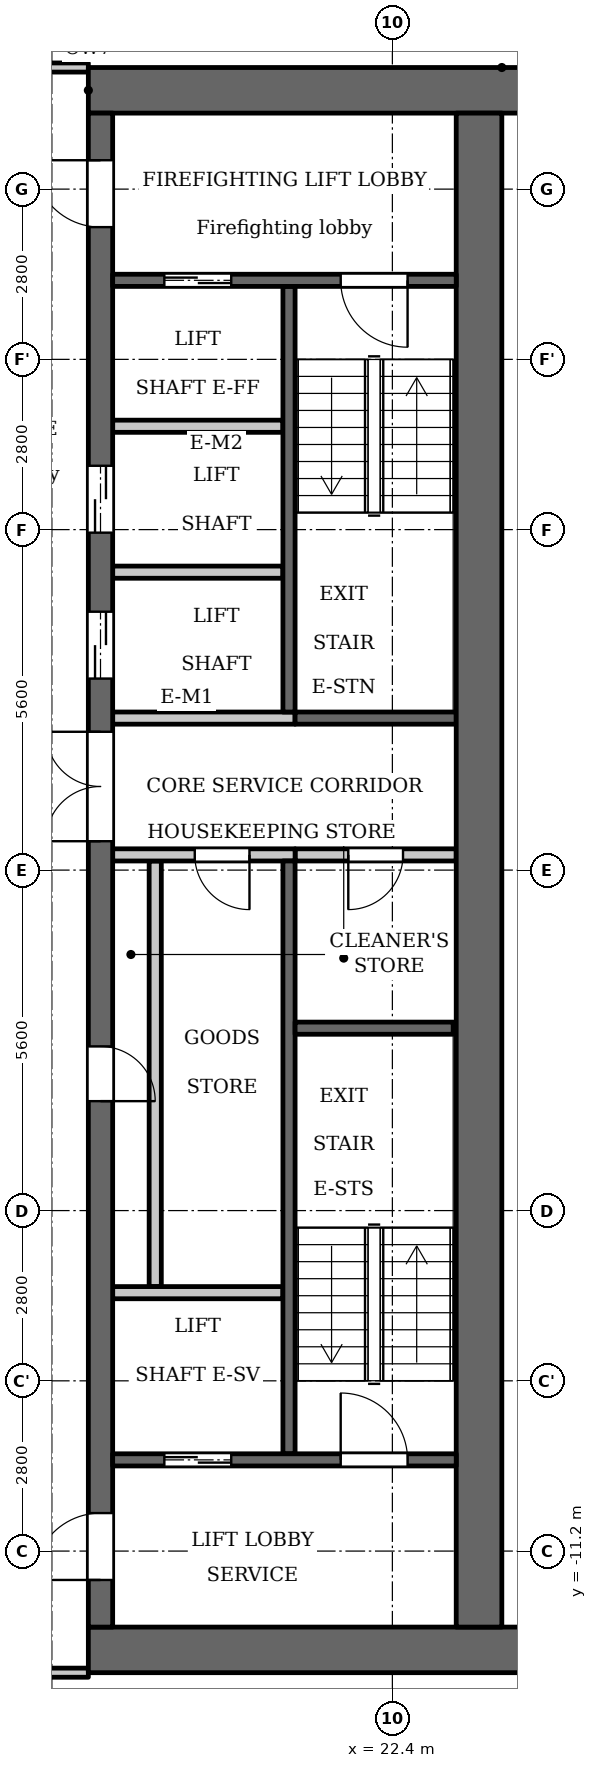
"""IFC4 building model, lengths in metres.
Left out: names, types, materials, properties, quantities, classifications, styles, units other than length and angle.
Written with IfcOpenShell. Run it as: python <this file> out.ifc"""

import sys

from ifc_helpers import new_model, si_unit, direction, frame, frame_2d, origin, place, context, subcontext, project, spatial, rectangle, extrude, element, fill, save


model = new_model("IFC4")
c1 = context("Model", 3, precision=1e-05, world=origin(), true_north=direction((0.0, 1.0)))
c2 = subcontext(c1, "Body", "Model", "MODEL_VIEW")
j1 = project(units=[si_unit("LENGTHUNIT", "METRE"), si_unit("PLANEANGLEUNIT", "RADIAN")], contexts=[c1])
p1 = place(None, origin())
s1 = spatial("IfcSite", under=j1, at=p1, CompositionType="ELEMENT")
p2 = place(p1, origin())
s2 = spatial("IfcBuilding", under=s1, at=p2, CompositionType="ELEMENT")
p3 = place(p2, frame((0.0, 0.0, 223.9)))
s3 = spatial("IfcBuildingStorey", under=s2, at=p3, CompositionType="ELEMENT", Elevation=223.9)
p4 = place(p3, frame((20.7, 2.6, 0.0), z_axis=(0.0, 0.0, 1.0), x_axis=(0.0, 1.0, 0.0)))
e1 = element("IfcWall", 1, at=p4, inside=s3, PredefinedType="SHEAR", context=c2, shape_type="SweptSolid", body=[
    extrude(rectangle(XDim=7.0, YDim=0.2, at=frame_2d((3.5, 0.0))), origin(), (0.0, 0.0, 1.0), 3.2),
])
p5 = place(p3, frame((20.7, -9.6, 0.0), z_axis=(0.0, 0.0, 1.0), x_axis=(0.0, 1.0, 0.0)))
e2 = element("IfcWall", 2, at=p5, inside=s3, PredefinedType="SHEAR", context=c2, shape_type="SweptSolid", body=[
    extrude(rectangle(XDim=9.75, YDim=0.2, at=frame_2d((4.875, 0.0))), origin(), (0.0, 0.0, 1.0), 3.2),
])
p6 = place(p3, frame((20.8, 2.5, 0.0), z_axis=(0.0, 0.0, 1.0), x_axis=(1.0, 0.0, 0.0)))
e3 = element("IfcWall", 3, at=p6, inside=s3, PredefinedType="SHEAR", context=c2, shape_type="SweptSolid", body=[
    extrude(rectangle(XDim=2.65, YDim=0.2, at=frame_2d((1.325, 0.0))), origin(), (0.0, 0.0, 1.0), 3.2),
])
p7 = place(p3, frame((20.8, 0.25, 0.0), z_axis=(0.0, 0.0, 1.0), x_axis=(1.0, 0.0, 0.0)))
e4 = element("IfcWall", 4, at=p7, inside=s3, PredefinedType="PARTITIONING", context=c2, shape_type="SweptSolid", body=[
    extrude(rectangle(XDim=2.65, YDim=0.2, at=frame_2d((1.325, 0.0))), origin(), (0.0, 0.0, 1.0), 3.2),
])
p8 = place(p7, frame((0.875, 0.0, 0.0)))
e5 = element("IfcOpeningElement", 5, at=p8, cuts=e4, PredefinedType="OPENING", context=c2, shape_type="SweptSolid", body=[
    extrude(rectangle(XDim=0.9, YDim=2.1, at=frame_2d((0.45, 1.05))), frame((0.0, 0.11, 0.0), z_axis=(0.0, -1.0, 0.0), x_axis=(1.0, 0.0, 0.0)), (0.0, 0.0, 1.0), 0.22),
])
for number, where, z_axis, x_axis in (
    (6, (17.4, 12.825, 0.0), (0.0, 0.0, 1.0), (1.0, 0.0, 0.0)),
    (7, (17.4, -12.825, 0.0), (0.0, 0.0, 1.0), (1.0, 0.0, 0.0)),
):
    element("IfcWall", number, at=place(p3, frame(where, z_axis=z_axis, x_axis=x_axis)), inside=s3, PredefinedType="SHEAR", context=c2, shape_type="SweptSolid", body=[
        extrude(rectangle(XDim=7.6, YDim=0.75, at=frame_2d((3.8, 0.0))), origin(), (0.0, 0.0, 1.0), 3.2),
    ])
p9 = place(p3, frame((18.5, -6.85, 0.0), z_axis=(0.0, 0.0, 1.0), x_axis=(0.0, 1.0, 0.0)))
e8 = element("IfcWall", 8, at=p9, inside=s3, PredefinedType="PARTITIONING", context=c2, shape_type="SweptSolid", body=[
    extrude(rectangle(XDim=7.0, YDim=0.2, at=frame_2d((3.5, 0.0))), origin(), (0.0, 0.0, 1.0), 3.2),
])
p10 = place(p3, frame((17.6, -12.45, 0.0), z_axis=(0.0, 0.0, 1.0), x_axis=(0.0, 1.0, 0.0)))
e9 = element("IfcWall", 9, at=p10, inside=s3, PredefinedType="SHEAR", context=c2, shape_type="SweptSolid", body=[
    extrude(rectangle(XDim=24.9, YDim=0.4, at=frame_2d((12.45, 0.0))), origin(), (0.0, 0.0, 1.0), 3.2),
])
p11 = place(p10, frame((8.65, 0.0, 0.0)))
e10 = element("IfcOpeningElement", 10, at=p11, cuts=e9, PredefinedType="OPENING", context=c2, shape_type="SweptSolid", body=[
    extrude(rectangle(XDim=0.9, YDim=2.1, at=frame_2d((0.45, 1.05))), frame((0.0, 0.21, 0.0), z_axis=(0.0, -1.0, 0.0), x_axis=(1.0, 0.0, 0.0)), (0.0, 0.0, 1.0), 0.42),
])
p12 = place(p10, frame((15.6, 0.0, 0.0)))
e11 = element("IfcOpeningElement", 11, at=p12, cuts=e9, PredefinedType="OPENING", context=c2, shape_type="SweptSolid", body=[
    extrude(rectangle(XDim=1.1, YDim=2.1, at=frame_2d((0.55, 1.05))), frame((0.0, 0.21, 0.0), z_axis=(0.0, -1.0, 0.0), x_axis=(1.0, 0.0, 0.0)), (0.0, 0.0, 1.0), 0.42),
])
p13 = place(p10, frame((18.0, 0.0, 0.0)))
e12 = element("IfcOpeningElement", 12, at=p13, cuts=e9, PredefinedType="OPENING", context=c2, shape_type="SweptSolid", body=[
    extrude(rectangle(XDim=1.1, YDim=2.1, at=frame_2d((0.55, 1.05))), frame((0.0, 0.21, 0.0), z_axis=(0.0, -1.0, 0.0), x_axis=(1.0, 0.0, 0.0)), (0.0, 0.0, 1.0), 0.42),
])
p14 = place(p10, frame((23.025, 0.0, 0.0)))
e13 = element("IfcOpeningElement", 13, at=p14, cuts=e9, PredefinedType="OPENING", context=c2, shape_type="SweptSolid", body=[
    extrude(rectangle(XDim=1.1, YDim=2.1, at=frame_2d((0.55, 1.05))), frame((0.0, 0.21, 0.0), z_axis=(0.0, -1.0, 0.0), x_axis=(1.0, 0.0, 0.0)), (0.0, 0.0, 1.0), 0.42),
])
p15 = place(p10, frame((0.775, 0.0, 0.0)))
e14 = element("IfcOpeningElement", 14, at=p15, cuts=e9, PredefinedType="OPENING", context=c2, shape_type="SweptSolid", body=[
    extrude(rectangle(XDim=1.1, YDim=2.1, at=frame_2d((0.55, 1.05))), frame((0.0, 0.21, 0.0), z_axis=(0.0, -1.0, 0.0), x_axis=(1.0, 0.0, 0.0)), (0.0, 0.0, 1.0), 0.42),
])
p16 = place(p10, frame((12.925, 0.0, 0.0)))
e15 = element("IfcOpeningElement", 15, at=p16, cuts=e9, PredefinedType="OPENING", context=c2, shape_type="SweptSolid", body=[
    extrude(rectangle(XDim=1.8, YDim=2.1, at=frame_2d((0.9, 1.05))), frame((0.0, 0.21, 0.0), z_axis=(0.0, -1.0, 0.0), x_axis=(1.0, 0.0, 0.0)), (0.0, 0.0, 1.0), 0.42),
])
p17 = place(p3, frame((23.825, -12.45, 0.0), z_axis=(0.0, 0.0, 1.0), x_axis=(0.0, 1.0, 0.0)))
e16 = element("IfcWall", 16, at=p17, inside=s3, PredefinedType="SHEAR", context=c2, shape_type="SweptSolid", body=[
    extrude(rectangle(XDim=24.9, YDim=0.75, at=frame_2d((12.45, 0.0))), origin(), (0.0, 0.0, 1.0), 3.2),
])
p18 = place(p3, frame((17.8, -9.7, 0.0), z_axis=(0.0, 0.0, 1.0), x_axis=(1.0, 0.0, 0.0)))
e17 = element("IfcWall", 17, at=p18, inside=s3, PredefinedType="SHEAR", context=c2, shape_type="SweptSolid", body=[
    extrude(rectangle(XDim=5.65, YDim=0.2, at=frame_2d((2.825, 0.0))), origin(), (0.0, 0.0, 1.0), 3.2),
])
p19 = place(p18, frame((0.85, 0.0, 0.0)))
e18 = element("IfcOpeningElement", 18, at=p19, cuts=e17, PredefinedType="OPENING", context=c2, shape_type="SweptSolid", body=[
    extrude(rectangle(XDim=1.1, YDim=2.1, at=frame_2d((0.55, 1.05))), frame((0.0, 0.11, 0.0), z_axis=(0.0, -1.0, 0.0), x_axis=(1.0, 0.0, 0.0)), (0.0, 0.0, 1.0), 0.22),
])
p20 = place(p18, frame((3.75, 0.0, 0.0)))
e19 = element("IfcOpeningElement", 19, at=p20, cuts=e17, PredefinedType="OPENING", context=c2, shape_type="SweptSolid", body=[
    extrude(rectangle(XDim=1.1, YDim=2.1, at=frame_2d((0.55, 1.05))), frame((0.0, 0.11, 0.0), z_axis=(0.0, -1.0, 0.0), x_axis=(1.0, 0.0, 0.0)), (0.0, 0.0, 1.0), 0.22),
])
p21 = place(p3, frame((17.8, -6.95, 0.0), z_axis=(0.0, 0.0, 1.0), x_axis=(1.0, 0.0, 0.0)))
e20 = element("IfcWall", 20, at=p21, inside=s3, PredefinedType="PARTITIONING", context=c2, shape_type="SweptSolid", body=[
    extrude(rectangle(XDim=2.8, YDim=0.2, at=frame_2d((1.4, 0.0))), origin(), (0.0, 0.0, 1.0), 3.2),
])
p22 = place(p3, frame((17.8, 0.25, 0.0), z_axis=(0.0, 0.0, 1.0), x_axis=(1.0, 0.0, 0.0)))
e21 = element("IfcWall", 21, at=p22, inside=s3, PredefinedType="PARTITIONING", context=c2, shape_type="SweptSolid", body=[
    extrude(rectangle(XDim=3.0, YDim=0.2, at=frame_2d((1.5, 0.0))), origin(), (0.0, 0.0, 1.0), 3.2),
])
p23 = place(p22, frame((1.35, 0.0, 0.0)))
e22 = element("IfcOpeningElement", 22, at=p23, cuts=e21, PredefinedType="OPENING", context=c2, shape_type="SweptSolid", body=[
    extrude(rectangle(XDim=0.9, YDim=2.1, at=frame_2d((0.45, 1.05))), frame((0.0, 0.11, 0.0), z_axis=(0.0, -1.0, 0.0), x_axis=(1.0, 0.0, 0.0)), (0.0, 0.0, 1.0), 0.22),
])
p24 = place(p3, frame((17.8, 2.5, 0.0), z_axis=(0.0, 0.0, 1.0), x_axis=(1.0, 0.0, 0.0)))
e23 = element("IfcWall", 23, at=p24, inside=s3, PredefinedType="PARTITIONING", context=c2, shape_type="SweptSolid", body=[
    extrude(rectangle(XDim=3.0, YDim=0.2, at=frame_2d((1.5, 0.0))), origin(), (0.0, 0.0, 1.0), 3.2),
])
for number, where, z_axis, x_axis in (
    (24, (17.8, 4.9, 0.0), (0.0, 0.0, 1.0), (1.0, 0.0, 0.0)),
    (25, (17.8, 7.3, 0.0), (0.0, 0.0, 1.0), (1.0, 0.0, 0.0)),
):
    element("IfcWall", number, at=place(p3, frame(where, z_axis=z_axis, x_axis=x_axis)), inside=s3, PredefinedType="PARTITIONING", context=c2, shape_type="SweptSolid", body=[
        extrude(rectangle(XDim=2.8, YDim=0.2, at=frame_2d((1.4, 0.0))), origin(), (0.0, 0.0, 1.0), 3.2),
    ])
p25 = place(p3, frame((17.8, 9.7, 0.0), z_axis=(0.0, 0.0, 1.0), x_axis=(1.0, 0.0, 0.0)))
e26 = element("IfcWall", 26, at=p25, inside=s3, PredefinedType="SHEAR", context=c2, shape_type="SweptSolid", body=[
    extrude(rectangle(XDim=5.65, YDim=0.2, at=frame_2d((2.825, 0.0))), origin(), (0.0, 0.0, 1.0), 3.2),
])
p26 = place(p25, frame((0.85, 0.0, 0.0)))
e27 = element("IfcOpeningElement", 27, at=p26, cuts=e26, PredefinedType="OPENING", context=c2, shape_type="SweptSolid", body=[
    extrude(rectangle(XDim=1.1, YDim=2.1, at=frame_2d((0.55, 1.05))), frame((0.0, 0.11, 0.0), z_axis=(0.0, -1.0, 0.0), x_axis=(1.0, 0.0, 0.0)), (0.0, 0.0, 1.0), 0.22),
])
p27 = place(p25, frame((3.75, 0.0, 0.0)))
e28 = element("IfcOpeningElement", 28, at=p27, cuts=e26, PredefinedType="OPENING", context=c2, shape_type="SweptSolid", body=[
    extrude(rectangle(XDim=1.1, YDim=2.1, at=frame_2d((0.55, 1.05))), frame((0.0, 0.11, 0.0), z_axis=(0.0, -1.0, 0.0), x_axis=(1.0, 0.0, 0.0)), (0.0, 0.0, 1.0), 0.22),
])
p28 = place(p3, frame((20.8, -2.6, 0.0), z_axis=(0.0, 0.0, 1.0), x_axis=(1.0, 0.0, 0.0)))
e29 = element("IfcWall", 29, at=p28, inside=s3, PredefinedType="SHEAR", context=c2, shape_type="SweptSolid", body=[
    extrude(rectangle(XDim=2.6, YDim=0.2, at=frame_2d((1.3, 0.0))), origin(), (0.0, 0.0, 1.0), 3.2),
])
p29 = place(p3, frame((-17.4, -13.2, 0.0), z_axis=(0.0, 0.0, 1.0), x_axis=(1.0, 0.0, 0.0)))
e30 = element("IfcWall", 30, at=p29, inside=s3, PredefinedType="PARTITIONING", context=c2, shape_type="SweptSolid", body=[
    extrude(rectangle(XDim=34.8, YDim=0.15, at=frame_2d((17.4, 0.0))), origin(), (0.0, 0.0, 1.0), 3.2),
])
p30 = place(p29, frame((0.65, 0.0, 0.0)))
e31 = element("IfcOpeningElement", 31, at=p30, cuts=e30, PredefinedType="OPENING", context=c2, shape_type="SweptSolid", body=[
    extrude(rectangle(XDim=1.0, YDim=2.1, at=frame_2d((0.5, 1.05))), frame((0.0, 0.085, 0.0), z_axis=(0.0, -1.0, 0.0), x_axis=(1.0, 0.0, 0.0)), (0.0, 0.0, 1.0), 0.17),
])
p31 = place(p29, frame((33.05, 0.0, 0.0)))
e32 = element("IfcOpeningElement", 32, at=p31, cuts=e30, PredefinedType="OPENING", context=c2, shape_type="SweptSolid", body=[
    extrude(rectangle(XDim=1.0, YDim=2.1, at=frame_2d((0.5, 1.05))), frame((0.0, 0.085, 0.0), z_axis=(0.0, -1.0, 0.0), x_axis=(1.0, 0.0, 0.0)), (0.0, 0.0, 1.0), 0.17),
])
p32 = place(p29, frame((10.15, 0.0, 0.0)))
e33 = element("IfcOpeningElement", 33, at=p32, cuts=e30, PredefinedType="OPENING", context=c2, shape_type="SweptSolid", body=[
    extrude(rectangle(XDim=1.0, YDim=2.1, at=frame_2d((0.5, 1.05))), frame((0.0, 0.085, 0.0), z_axis=(0.0, -1.0, 0.0), x_axis=(1.0, 0.0, 0.0)), (0.0, 0.0, 1.0), 0.17),
])
p33 = place(p29, frame((12.5, 0.0, 0.0)))
e34 = element("IfcOpeningElement", 34, at=p33, cuts=e30, PredefinedType="OPENING", context=c2, shape_type="SweptSolid", body=[
    extrude(rectangle(XDim=1.0, YDim=2.1, at=frame_2d((0.5, 1.05))), frame((0.0, 0.085, 0.0), z_axis=(0.0, -1.0, 0.0), x_axis=(1.0, 0.0, 0.0)), (0.0, 0.0, 1.0), 0.17),
])
p34 = place(p29, frame((18.0, 0.0, 0.0)))
e35 = element("IfcOpeningElement", 35, at=p34, cuts=e30, PredefinedType="OPENING", context=c2, shape_type="SweptSolid", body=[
    extrude(rectangle(XDim=1.0, YDim=2.1, at=frame_2d((0.5, 1.05))), frame((0.0, 0.085, 0.0), z_axis=(0.0, -1.0, 0.0), x_axis=(1.0, 0.0, 0.0)), (0.0, 0.0, 1.0), 0.17),
])
p35 = place(p29, frame((30.75, 0.0, 0.0)))
e36 = element("IfcOpeningElement", 36, at=p35, cuts=e30, PredefinedType="OPENING", context=c2, shape_type="SweptSolid", body=[
    extrude(rectangle(XDim=1.0, YDim=2.1, at=frame_2d((0.5, 1.05))), frame((0.0, 0.085, 0.0), z_axis=(0.0, -1.0, 0.0), x_axis=(1.0, 0.0, 0.0)), (0.0, 0.0, 1.0), 0.17),
])
p36 = place(p3, frame((-17.4, 13.2, 0.0), z_axis=(0.0, 0.0, 1.0), x_axis=(1.0, 0.0, 0.0)))
e37 = element("IfcWall", 37, at=p36, inside=s3, PredefinedType="PARTITIONING", context=c2, shape_type="SweptSolid", body=[
    extrude(rectangle(XDim=34.8, YDim=0.15, at=frame_2d((17.4, 0.0))), origin(), (0.0, 0.0, 1.0), 3.2),
])
p37 = place(p36, frame((0.75, 0.0, 0.0)))
e38 = element("IfcOpeningElement", 38, at=p37, cuts=e37, PredefinedType="OPENING", context=c2, shape_type="SweptSolid", body=[
    extrude(rectangle(XDim=1.0, YDim=2.1, at=frame_2d((0.5, 1.05))), frame((0.0, 0.085, 0.0), z_axis=(0.0, -1.0, 0.0), x_axis=(1.0, 0.0, 0.0)), (0.0, 0.0, 1.0), 0.17),
])
p38 = place(p36, frame((33.15, 0.0, 0.0)))
e39 = element("IfcOpeningElement", 39, at=p38, cuts=e37, PredefinedType="OPENING", context=c2, shape_type="SweptSolid", body=[
    extrude(rectangle(XDim=1.0, YDim=2.1, at=frame_2d((0.5, 1.05))), frame((0.0, 0.085, 0.0), z_axis=(0.0, -1.0, 0.0), x_axis=(1.0, 0.0, 0.0)), (0.0, 0.0, 1.0), 0.17),
])
p39 = place(p36, frame((3.05, 0.0, 0.0)))
e40 = element("IfcOpeningElement", 40, at=p39, cuts=e37, PredefinedType="OPENING", context=c2, shape_type="SweptSolid", body=[
    extrude(rectangle(XDim=1.0, YDim=2.1, at=frame_2d((0.5, 1.05))), frame((0.0, 0.085, 0.0), z_axis=(0.0, -1.0, 0.0), x_axis=(1.0, 0.0, 0.0)), (0.0, 0.0, 1.0), 0.17),
])
p40 = place(p36, frame((10.1, 0.0, 0.0)))
e41 = element("IfcOpeningElement", 41, at=p40, cuts=e37, PredefinedType="OPENING", context=c2, shape_type="SweptSolid", body=[
    extrude(rectangle(XDim=1.0, YDim=2.1, at=frame_2d((0.5, 1.05))), frame((0.0, 0.085, 0.0), z_axis=(0.0, -1.0, 0.0), x_axis=(1.0, 0.0, 0.0)), (0.0, 0.0, 1.0), 0.17),
])
p41 = place(p36, frame((12.45, 0.0, 0.0)))
e42 = element("IfcOpeningElement", 42, at=p41, cuts=e37, PredefinedType="OPENING", context=c2, shape_type="SweptSolid", body=[
    extrude(rectangle(XDim=1.0, YDim=2.1, at=frame_2d((0.5, 1.05))), frame((0.0, 0.085, 0.0), z_axis=(0.0, -1.0, 0.0), x_axis=(1.0, 0.0, 0.0)), (0.0, 0.0, 1.0), 0.17),
])
p42 = place(p36, frame((21.3, 0.0, 0.0)))
e43 = element("IfcOpeningElement", 43, at=p42, cuts=e37, PredefinedType="OPENING", context=c2, shape_type="SweptSolid", body=[
    extrude(rectangle(XDim=1.0, YDim=2.1, at=frame_2d((0.5, 1.05))), frame((0.0, 0.085, 0.0), z_axis=(0.0, -1.0, 0.0), x_axis=(1.0, 0.0, 0.0)), (0.0, 0.0, 1.0), 0.17),
])
p43 = place(p36, frame((23.65, 0.0, 0.0)))
e44 = element("IfcOpeningElement", 44, at=p43, cuts=e37, PredefinedType="OPENING", context=c2, shape_type="SweptSolid", body=[
    extrude(rectangle(XDim=1.0, YDim=2.1, at=frame_2d((0.5, 1.05))), frame((0.0, 0.085, 0.0), z_axis=(0.0, -1.0, 0.0), x_axis=(1.0, 0.0, 0.0)), (0.0, 0.0, 1.0), 0.17),
])
p44 = place(p36, frame((30.75, 0.0, 0.0)))
e45 = element("IfcOpeningElement", 45, at=p44, cuts=e37, PredefinedType="OPENING", context=c2, shape_type="SweptSolid", body=[
    extrude(rectangle(XDim=1.0, YDim=2.1, at=frame_2d((0.5, 1.05))), frame((0.0, 0.085, 0.0), z_axis=(0.0, -1.0, 0.0), x_axis=(1.0, 0.0, 0.0)), (0.0, 0.0, 1.0), 0.17),
])
p45 = place(p19, origin())
e46 = element("IfcDoor", 46, at=p45, inside=s3, OperationType="DOUBLE_DOOR_SLIDING", PredefinedType="DOOR", context=c2, shape_type="SweptSolid", body=[
    extrude(rectangle(XDim=1.1, YDim=2.1, at=frame_2d((0.55, 1.05))), frame((0.0, 0.025, 0.0), z_axis=(0.0, -1.0, 0.0), x_axis=(1.0, 0.0, 0.0)), (0.0, 0.0, 1.0), 0.05),
])
fill(e18, e46)
p46 = place(p11, origin())
e47 = element("IfcDoor", 47, at=p46, inside=s3, OperationType="SINGLE_SWING_LEFT", PredefinedType="DOOR", context=c2, shape_type="SweptSolid", body=[
    extrude(rectangle(XDim=0.9, YDim=2.1, at=frame_2d((0.45, 1.05))), frame((0.0, 0.025, 0.0), z_axis=(0.0, -1.0, 0.0), x_axis=(1.0, 0.0, 0.0)), (0.0, 0.0, 1.0), 0.05),
])
fill(e10, e47)
p47 = place(p23, origin())
e48 = element("IfcDoor", 48, at=p47, inside=s3, OperationType="SINGLE_SWING_RIGHT", PredefinedType="DOOR", context=c2, shape_type="SweptSolid", body=[
    extrude(rectangle(XDim=0.9, YDim=2.1, at=frame_2d((0.45, 1.05))), frame((0.0, 0.025, 0.0), z_axis=(0.0, -1.0, 0.0), x_axis=(1.0, 0.0, 0.0)), (0.0, 0.0, 1.0), 0.05),
])
fill(e22, e48)
p48 = place(p12, origin())
e49 = element("IfcDoor", 49, at=p48, inside=s3, OperationType="DOUBLE_DOOR_SLIDING", PredefinedType="DOOR", context=c2, shape_type="SweptSolid", body=[
    extrude(rectangle(XDim=1.1, YDim=2.1, at=frame_2d((0.55, 1.05))), frame((0.0, 0.025, 0.0), z_axis=(0.0, -1.0, 0.0), x_axis=(1.0, 0.0, 0.0)), (0.0, 0.0, 1.0), 0.05),
])
fill(e11, e49)
p49 = place(p13, origin())
e50 = element("IfcDoor", 50, at=p49, inside=s3, OperationType="DOUBLE_DOOR_SLIDING", PredefinedType="DOOR", context=c2, shape_type="SweptSolid", body=[
    extrude(rectangle(XDim=1.1, YDim=2.1, at=frame_2d((0.55, 1.05))), frame((0.0, 0.025, 0.0), z_axis=(0.0, -1.0, 0.0), x_axis=(1.0, 0.0, 0.0)), (0.0, 0.0, 1.0), 0.05),
])
fill(e12, e50)
p50 = place(p26, origin())
e51 = element("IfcDoor", 51, at=p50, inside=s3, OperationType="DOUBLE_DOOR_SLIDING", PredefinedType="DOOR", context=c2, shape_type="SweptSolid", body=[
    extrude(rectangle(XDim=1.1, YDim=2.1, at=frame_2d((0.55, 1.05))), frame((0.0, 0.025, 0.0), z_axis=(0.0, -1.0, 0.0), x_axis=(1.0, 0.0, 0.0)), (0.0, 0.0, 1.0), 0.05),
])
fill(e27, e51)
p51 = place(p14, origin())
e52 = element("IfcDoor", 52, at=p51, inside=s3, OperationType="SINGLE_SWING_LEFT", PredefinedType="DOOR", context=c2, shape_type="SweptSolid", body=[
    extrude(rectangle(XDim=1.1, YDim=2.1, at=frame_2d((0.55, 1.05))), frame((0.0, 0.025, 0.0), z_axis=(0.0, -1.0, 0.0), x_axis=(1.0, 0.0, 0.0)), (0.0, 0.0, 1.0), 0.05),
])
fill(e13, e52)
p52 = place(p15, origin())
e53 = element("IfcDoor", 53, at=p52, inside=s3, OperationType="SINGLE_SWING_RIGHT", PredefinedType="DOOR", context=c2, shape_type="SweptSolid", body=[
    extrude(rectangle(XDim=1.1, YDim=2.1, at=frame_2d((0.55, 1.05))), frame((0.0, 0.025, 0.0), z_axis=(0.0, -1.0, 0.0), x_axis=(1.0, 0.0, 0.0)), (0.0, 0.0, 1.0), 0.05),
])
fill(e14, e53)
p53 = place(p27, origin())
e54 = element("IfcDoor", 54, at=p53, inside=s3, OperationType="SINGLE_SWING_RIGHT", PredefinedType="DOOR", context=c2, shape_type="SweptSolid", body=[
    extrude(rectangle(XDim=1.1, YDim=2.1, at=frame_2d((0.55, 1.05))), frame((0.0, 0.025, 0.0), z_axis=(0.0, -1.0, 0.0), x_axis=(1.0, 0.0, 0.0)), (0.0, 0.0, 1.0), 0.05),
])
fill(e28, e54)
p54 = place(p20, origin())
e55 = element("IfcDoor", 55, at=p54, inside=s3, OperationType="SINGLE_SWING_RIGHT", PredefinedType="DOOR", context=c2, shape_type="SweptSolid", body=[
    extrude(rectangle(XDim=1.1, YDim=2.1, at=frame_2d((0.55, 1.05))), frame((0.0, 0.025, 0.0), z_axis=(0.0, -1.0, 0.0), x_axis=(1.0, 0.0, 0.0)), (0.0, 0.0, 1.0), 0.05),
])
fill(e19, e55)
p55 = place(p16, origin())
e56 = element("IfcDoor", 56, at=p55, inside=s3, OperationType="DOUBLE_DOOR_SINGLE_SWING", PredefinedType="DOOR", context=c2, shape_type="SweptSolid", body=[
    extrude(rectangle(XDim=1.8, YDim=2.1, at=frame_2d((0.9, 1.05))), frame((0.0, 0.025, 0.0), z_axis=(0.0, -1.0, 0.0), x_axis=(1.0, 0.0, 0.0)), (0.0, 0.0, 1.0), 0.05),
])
fill(e15, e56)
p56 = place(p8, origin())
e57 = element("IfcDoor", 57, at=p56, inside=s3, OperationType="SINGLE_SWING_LEFT", PredefinedType="DOOR", context=c2, shape_type="SweptSolid", body=[
    extrude(rectangle(XDim=0.9, YDim=2.1, at=frame_2d((0.45, 1.05))), frame((0.0, 0.025, 0.0), z_axis=(0.0, -1.0, 0.0), x_axis=(1.0, 0.0, 0.0)), (0.0, 0.0, 1.0), 0.05),
])
fill(e5, e57)
save(model, sys.argv[1])
